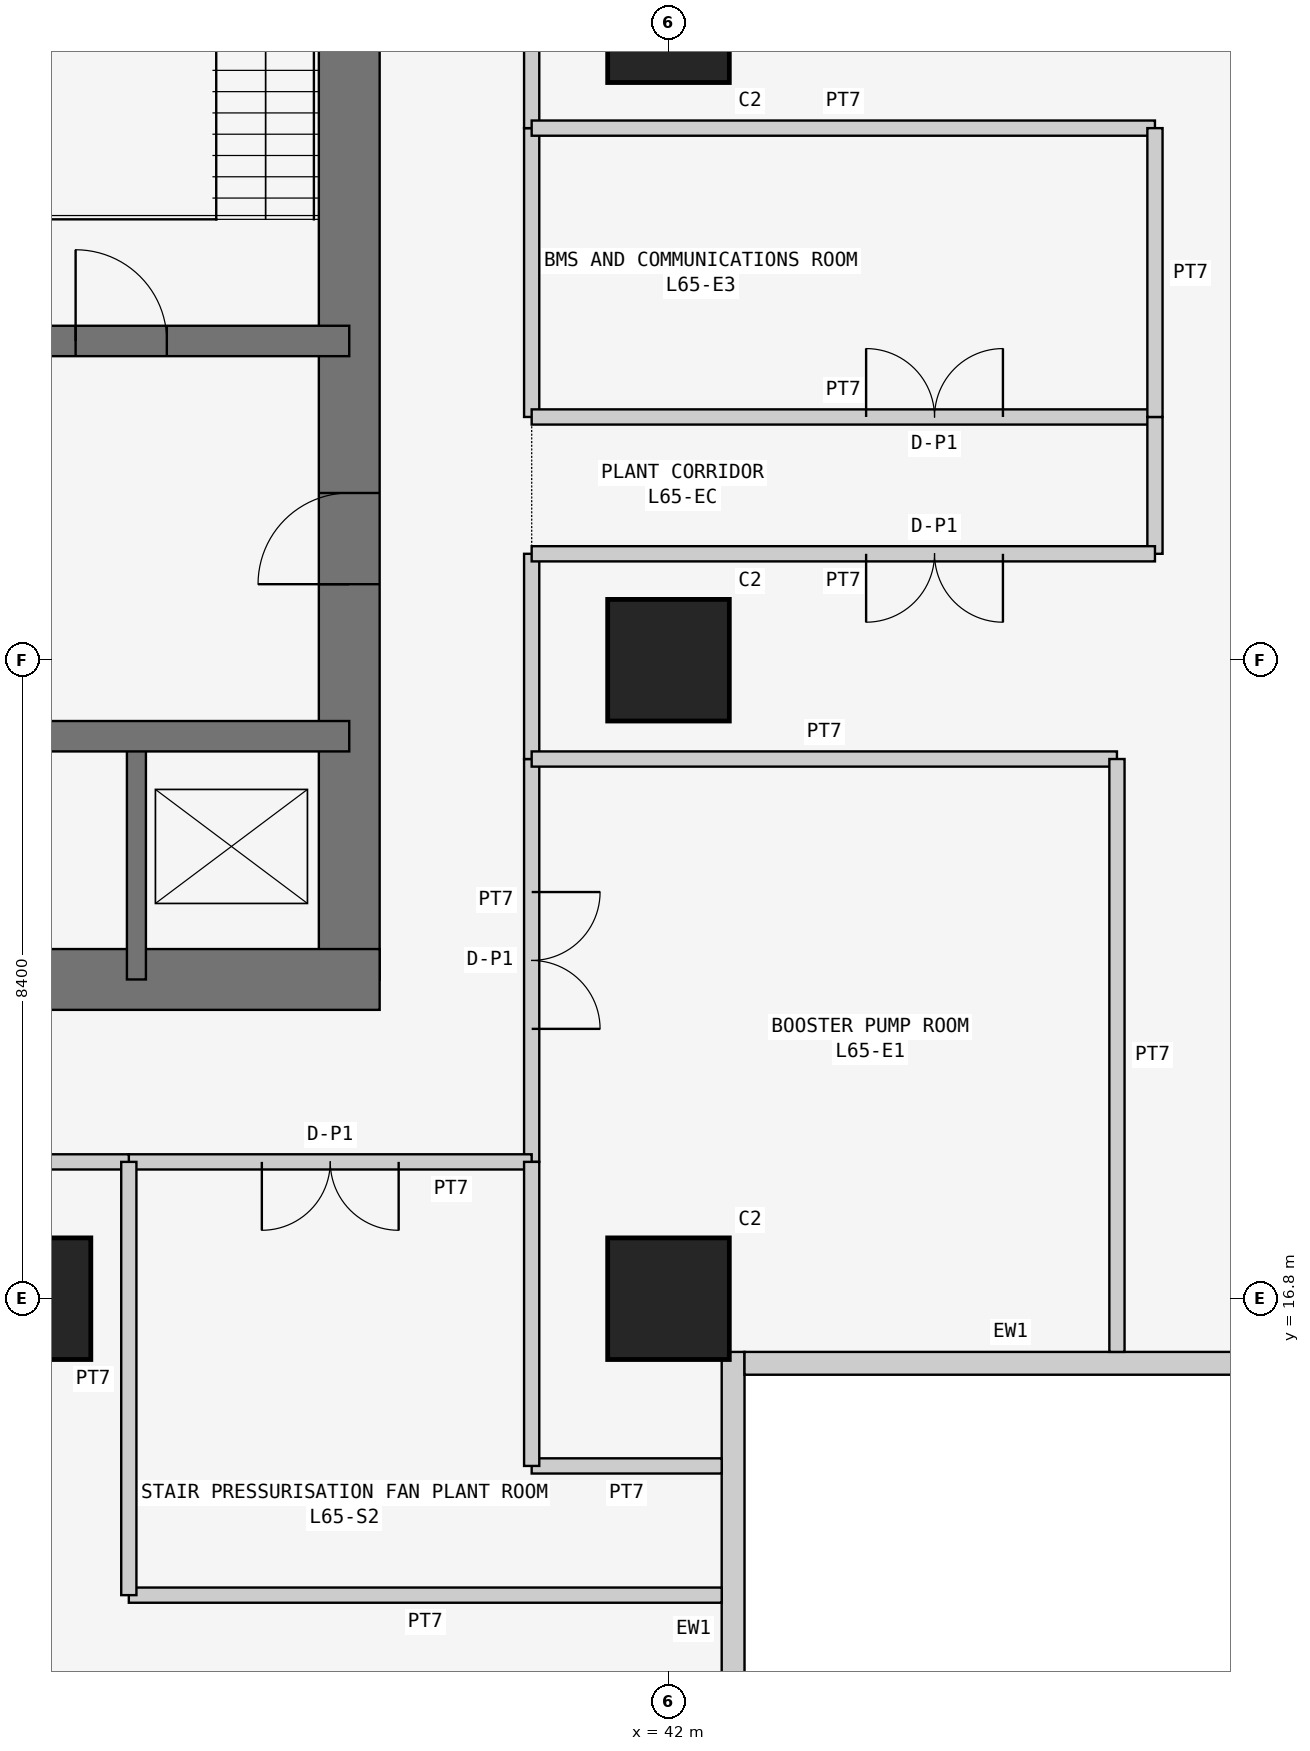
"""IFC4 building model, lengths in metres.
Left out: names, types, materials, properties, quantities, classifications, styles, units other than length and angle.
Written with IfcOpenShell. Run it as: python <this file> out.ifc"""

import sys

from ifc_helpers import new_model, si_unit, direction, frame, frame_2d, origin, origin_2d, place, context, subcontext, project, spatial, rectangle, extrude, element, fill, save


model = new_model("IFC4")
c1 = context("Model", 3, precision=1e-05, world=origin(), true_north=direction((0.0, 1.0)))
c2 = subcontext(c1, "Body", "Model", "MODEL_VIEW")
j1 = project(units=[si_unit("LENGTHUNIT", "METRE"), si_unit("PLANEANGLEUNIT", "RADIAN")], contexts=[c1])
p1 = place(None, origin())
s1 = spatial("IfcSite", under=j1, at=p1, CompositionType="ELEMENT")
p2 = place(p1, origin())
s2 = spatial("IfcBuilding", under=s1, at=p2, CompositionType="ELEMENT")
p3 = place(p2, frame((0.0, 0.0, 248.1)))
s3 = spatial("IfcBuildingStorey", under=s2, at=p3, CompositionType="ELEMENT", Elevation=248.1)
for number, where, z_axis, x_axis in (
    (1, (33.6, 16.8, 0.0), (0.0, 0.0, 1.0), (1.0, 0.0, 0.0)),
    (2, (42.0, 16.8, 0.0), (0.0, 0.0, 1.0), (1.0, 0.0, 0.0)),
    (3, (42.0, 25.2, 0.0), (0.0, 0.0, 1.0), (1.0, 0.0, 0.0)),
    (4, (42.0, 33.6, 0.0), (0.0, 0.0, 1.0), (1.0, 0.0, 0.0)),
):
    element("IfcColumn", number, at=place(p3, frame(where, z_axis=z_axis, x_axis=x_axis)), inside=s3, PredefinedType="COLUMN", context=c2, shape_type="SweptSolid", body=[
        extrude(rectangle(XDim=1.6, YDim=1.6, at=origin_2d()), origin(), (0.0, 0.0, 1.0), 6.0),
    ])
p4 = place(p3, frame((21.0, 21.0, 0.0), z_axis=(0.0, 0.0, 1.0), x_axis=(1.0, 0.0, 0.0)))
e5 = element("IfcWall", 5, at=p4, inside=s3, PredefinedType="SHEAR", context=c2, shape_type="SweptSolid", body=[
    extrude(rectangle(XDim=17.2, YDim=0.8, at=frame_2d((8.6, 0.0))), origin(), (0.0, 0.0, 1.0), 6.0),
])
p5 = place(p3, frame((37.8, 21.0, 0.0), z_axis=(0.0, 0.0, 1.0), x_axis=(0.0, 1.0, 0.0)))
e6 = element("IfcWall", 6, at=p5, inside=s3, PredefinedType="SHEAR", context=c2, shape_type="SweptSolid", body=[
    extrude(rectangle(XDim=17.2, YDim=0.8, at=frame_2d((8.6, 0.0))), origin(), (0.0, 0.0, 1.0), 6.0),
])
p6 = place(p5, frame((5.2, 0.0, 0.0)))
e7 = element("IfcOpeningElement", 7, at=p6, cuts=e6, PredefinedType="OPENING", context=c2, shape_type="SweptSolid", body=[
    extrude(rectangle(XDim=1.2, YDim=2.1, at=frame_2d((0.6, 1.05))), frame((0.0, 0.41, 0.0), z_axis=(0.0, -1.0, 0.0), x_axis=(1.0, 0.0, 0.0)), (0.0, 0.0, 1.0), 0.82),
])
p7 = place(p3, frame((26.6, 24.2, 0.0), z_axis=(0.0, 0.0, 1.0), x_axis=(1.0, 0.0, 0.0)))
e8 = element("IfcWall", 8, at=p7, inside=s3, PredefinedType="SHEAR", context=c2, shape_type="SweptSolid", body=[
    extrude(rectangle(XDim=11.2, YDim=0.4, at=frame_2d((5.6, 0.0))), origin(), (0.0, 0.0, 1.0), 6.0),
])
p8 = place(p7, frame((0.938, 0.0, 0.0)))
e9 = element("IfcOpeningElement", 9, at=p8, cuts=e8, PredefinedType="OPENING", context=c2, shape_type="SweptSolid", body=[
    extrude(rectangle(XDim=1.0, YDim=2.1, at=frame_2d((0.5, 1.05))), frame((0.0, 0.21, 0.0), z_axis=(0.0, -1.0, 0.0), x_axis=(1.0, 0.0, 0.0)), (0.0, 0.0, 1.0), 0.42),
])
p9 = place(p7, frame((3.75, 0.0, 0.0)))
e10 = element("IfcOpeningElement", 10, at=p9, cuts=e8, PredefinedType="OPENING", context=c2, shape_type="SweptSolid", body=[
    extrude(rectangle(XDim=0.9, YDim=2.1, at=frame_2d((0.45, 1.05))), frame((0.0, 0.21, 0.0), z_axis=(0.0, -1.0, 0.0), x_axis=(1.0, 0.0, 0.0)), (0.0, 0.0, 1.0), 0.42),
])
p10 = place(p3, frame((32.2, 29.4, 0.0), z_axis=(0.0, 0.0, 1.0), x_axis=(1.0, 0.0, 0.0)))
e11 = element("IfcWall", 11, at=p10, inside=s3, PredefinedType="SHEAR", context=c2, shape_type="SweptSolid", body=[
    extrude(rectangle(XDim=5.6, YDim=0.4, at=frame_2d((2.8, 0.0))), origin(), (0.0, 0.0, 1.0), 6.0),
])
p11 = place(p10, frame((2.0, 0.0, 0.0)))
e12 = element("IfcOpeningElement", 12, at=p11, cuts=e11, PredefinedType="OPENING", context=c2, shape_type="SweptSolid", body=[
    extrude(rectangle(XDim=1.2, YDim=2.1, at=frame_2d((0.6, 1.05))), frame((0.0, 0.21, 0.0), z_axis=(0.0, -1.0, 0.0), x_axis=(1.0, 0.0, 0.0)), (0.0, 0.0, 1.0), 0.42),
])
p12 = place(p3, frame((35.0, 21.0, 0.0), z_axis=(0.0, 0.0, 1.0), x_axis=(0.0, 1.0, 0.0)))
e13 = element("IfcWall", 13, at=p12, inside=s3, PredefinedType="SHEAR", context=c2, shape_type="SweptSolid", body=[
    extrude(rectangle(XDim=3.2, YDim=0.25, at=frame_2d((1.6, 0.0))), origin(), (0.0, 0.0, 1.0), 6.0),
])
p13 = place(p3, frame((42.85, 8.8, 0.0), z_axis=(0.0, 0.0, 1.0), x_axis=(0.0, 1.0, 0.0)))
e14 = element("IfcWall", 14, at=p13, inside=s3, PredefinedType="SOLIDWALL", context=c2, shape_type="SweptSolid", body=[
    extrude(rectangle(XDim=7.3, YDim=0.3, at=frame_2d((3.65, 0.0))), origin(), (0.0, 0.0, 1.0), 5.85),
])
p14 = place(p3, frame((43.0, 15.95, 0.0), z_axis=(0.0, 0.0, 1.0), x_axis=(1.0, 0.0, 0.0)))
e15 = element("IfcWall", 15, at=p14, inside=s3, PredefinedType="SOLIDWALL", context=c2, shape_type="SweptSolid", body=[
    extrude(rectangle(XDim=7.0, YDim=0.3, at=frame_2d((3.5, 0.0))), origin(), (0.0, 0.0, 1.0), 5.85),
])
p15 = place(p3, frame((40.2, 23.9, 0.0), z_axis=(0.0, 0.0, 1.0), x_axis=(0.0, -1.0, 0.0)))
e16 = element("IfcWall", 16, at=p15, inside=s3, PredefinedType="PARTITIONING", context=c2, shape_type="SweptSolid", body=[
    extrude(rectangle(XDim=5.3, YDim=0.2, at=frame_2d((2.65, 0.0))), origin(), (0.0, 0.0, 1.0), 5.85),
])
p16 = place(p15, frame((1.75, 0.0, 0.0)))
e17 = element("IfcOpeningElement", 17, at=p16, cuts=e16, PredefinedType="OPENING", context=c2, shape_type="SweptSolid", body=[
    extrude(rectangle(XDim=1.8, YDim=2.4, at=frame_2d((0.9, 1.2))), frame((0.0, 0.11, 0.0), z_axis=(0.0, -1.0, 0.0), x_axis=(1.0, 0.0, 0.0)), (0.0, 0.0, 1.0), 0.22),
])
p17 = place(p3, frame((40.2, 32.2, 0.0), z_axis=(0.0, 0.0, 1.0), x_axis=(0.0, -1.0, 0.0)))
e18 = element("IfcWall", 18, at=p17, inside=s3, PredefinedType="PARTITIONING", context=c2, shape_type="SweptSolid", body=[
    extrude(rectangle(XDim=3.8, YDim=0.2, at=frame_2d((1.9, 0.0))), origin(), (0.0, 0.0, 1.0), 5.85),
])
p18 = place(p3, frame((40.2, 26.6, 0.0), z_axis=(0.0, 0.0, 1.0), x_axis=(0.0, -1.0, 0.0)))
e19 = element("IfcWall", 19, at=p18, inside=s3, PredefinedType="PARTITIONING", context=c2, shape_type="SweptSolid", body=[
    extrude(rectangle(XDim=2.7, YDim=0.2, at=frame_2d((1.35, 0.0))), origin(), (0.0, 0.0, 1.0), 5.85),
])
p19 = place(p3, frame((40.2, 34.9, 0.0), z_axis=(0.0, 0.0, 1.0), x_axis=(0.0, -1.0, 0.0)))
e20 = element("IfcWall", 20, at=p19, inside=s3, PredefinedType="PARTITIONING", context=c2, shape_type="SweptSolid", body=[
    extrude(rectangle(XDim=2.7, YDim=0.2, at=frame_2d((1.35, 0.0))), origin(), (0.0, 0.0, 1.0), 5.85),
])
p20 = place(p3, frame((40.2, 18.6, 0.0), z_axis=(0.0, 0.0, 1.0), x_axis=(-1.0, 0.0, 0.0)))
e21 = element("IfcWall", 21, at=p20, inside=s3, PredefinedType="PARTITIONING", context=c2, shape_type="SweptSolid", body=[
    extrude(rectangle(XDim=5.3, YDim=0.2, at=frame_2d((2.65, 0.0))), origin(), (0.0, 0.0, 1.0), 5.85),
])
p21 = place(p20, frame((1.75, 0.0, 0.0)))
e22 = element("IfcOpeningElement", 22, at=p21, cuts=e21, PredefinedType="OPENING", context=c2, shape_type="SweptSolid", body=[
    extrude(rectangle(XDim=1.8, YDim=2.4, at=frame_2d((0.9, 1.2))), frame((0.0, 0.11, 0.0), z_axis=(0.0, -1.0, 0.0), x_axis=(1.0, 0.0, 0.0)), (0.0, 0.0, 1.0), 0.22),
])
p22 = place(p3, frame((34.9, 18.6, 0.0), z_axis=(0.0, 0.0, 1.0), x_axis=(-1.0, 0.0, 0.0)))
e23 = element("IfcWall", 23, at=p22, inside=s3, PredefinedType="PARTITIONING", context=c2, shape_type="SweptSolid", body=[
    extrude(rectangle(XDim=2.7, YDim=0.2, at=frame_2d((1.35, 0.0))), origin(), (0.0, 0.0, 1.0), 5.85),
])
p23 = place(p3, frame((40.2, 23.9, 0.0), z_axis=(0.0, 0.0, 1.0), x_axis=(1.0, 0.0, 0.0)))
e24 = element("IfcWall", 24, at=p23, inside=s3, PredefinedType="PARTITIONING", context=c2, shape_type="SweptSolid", body=[
    extrude(rectangle(XDim=7.7, YDim=0.2, at=frame_2d((3.85, 0.0))), origin(), (0.0, 0.0, 1.0), 5.85),
])
p24 = place(p3, frame((47.9, 23.9, 0.0), z_axis=(0.0, 0.0, 1.0), x_axis=(0.0, -1.0, 0.0)))
e25 = element("IfcWall", 25, at=p24, inside=s3, PredefinedType="PARTITIONING", context=c2, shape_type="SweptSolid", body=[
    extrude(rectangle(XDim=7.8, YDim=0.2, at=frame_2d((3.9, 0.0))), origin(), (0.0, 0.0, 1.0), 5.85),
])
p25 = place(p3, frame((42.7, 14.6, 0.0), z_axis=(0.0, 0.0, 1.0), x_axis=(-1.0, 0.0, 0.0)))
e26 = element("IfcWall", 26, at=p25, inside=s3, PredefinedType="PARTITIONING", context=c2, shape_type="SweptSolid", body=[
    extrude(rectangle(XDim=2.5, YDim=0.2, at=frame_2d((1.25, 0.0))), origin(), (0.0, 0.0, 1.0), 5.85),
])
p26 = place(p3, frame((40.2, 14.6, 0.0), z_axis=(0.0, 0.0, 1.0), x_axis=(0.0, 1.0, 0.0)))
e27 = element("IfcWall", 27, at=p26, inside=s3, PredefinedType="PARTITIONING", context=c2, shape_type="SweptSolid", body=[
    extrude(rectangle(XDim=4.0, YDim=0.2, at=frame_2d((2.0, 0.0))), origin(), (0.0, 0.0, 1.0), 5.85),
])
p27 = place(p3, frame((40.2, 28.4, 0.0), z_axis=(0.0, 0.0, 1.0), x_axis=(1.0, 0.0, 0.0)))
e28 = element("IfcWall", 28, at=p27, inside=s3, PredefinedType="PARTITIONING", context=c2, shape_type="SweptSolid", body=[
    extrude(rectangle(XDim=8.2, YDim=0.2, at=frame_2d((4.1, 0.0))), origin(), (0.0, 0.0, 1.0), 5.85),
])
p28 = place(p27, frame((4.4, 0.0, 0.0)))
e29 = element("IfcOpeningElement", 29, at=p28, cuts=e28, PredefinedType="OPENING", context=c2, shape_type="SweptSolid", body=[
    extrude(rectangle(XDim=1.8, YDim=2.4, at=frame_2d((0.9, 1.2))), frame((0.0, 0.11, 0.0), z_axis=(0.0, -1.0, 0.0), x_axis=(1.0, 0.0, 0.0)), (0.0, 0.0, 1.0), 0.22),
])
p29 = place(p3, frame((48.4, 28.4, 0.0), z_axis=(0.0, 0.0, 1.0), x_axis=(0.0, -1.0, 0.0)))
e30 = element("IfcWall", 30, at=p29, inside=s3, PredefinedType="PARTITIONING", context=c2, shape_type="SweptSolid", body=[
    extrude(rectangle(XDim=1.8, YDim=0.2, at=frame_2d((0.9, 0.0))), origin(), (0.0, 0.0, 1.0), 5.85),
])
p30 = place(p3, frame((48.4, 26.6, 0.0), z_axis=(0.0, 0.0, 1.0), x_axis=(-1.0, 0.0, 0.0)))
e31 = element("IfcWall", 31, at=p30, inside=s3, PredefinedType="PARTITIONING", context=c2, shape_type="SweptSolid", body=[
    extrude(rectangle(XDim=8.2, YDim=0.2, at=frame_2d((4.1, 0.0))), origin(), (0.0, 0.0, 1.0), 5.85),
])
p31 = place(p30, frame((2.0, 0.0, 0.0)))
e32 = element("IfcOpeningElement", 32, at=p31, cuts=e31, PredefinedType="OPENING", context=c2, shape_type="SweptSolid", body=[
    extrude(rectangle(XDim=1.8, YDim=2.4, at=frame_2d((0.9, 1.2))), frame((0.0, 0.11, 0.0), z_axis=(0.0, -1.0, 0.0), x_axis=(1.0, 0.0, 0.0)), (0.0, 0.0, 1.0), 0.22),
])
p32 = place(p3, frame((40.2, 32.2, 0.0), z_axis=(0.0, 0.0, 1.0), x_axis=(1.0, 0.0, 0.0)))
e33 = element("IfcWall", 33, at=p32, inside=s3, PredefinedType="PARTITIONING", context=c2, shape_type="SweptSolid", body=[
    extrude(rectangle(XDim=8.2, YDim=0.2, at=frame_2d((4.1, 0.0))), origin(), (0.0, 0.0, 1.0), 5.85),
])
p33 = place(p3, frame((48.4, 32.2, 0.0), z_axis=(0.0, 0.0, 1.0), x_axis=(0.0, -1.0, 0.0)))
e34 = element("IfcWall", 34, at=p33, inside=s3, PredefinedType="PARTITIONING", context=c2, shape_type="SweptSolid", body=[
    extrude(rectangle(XDim=3.8, YDim=0.2, at=frame_2d((1.9, 0.0))), origin(), (0.0, 0.0, 1.0), 5.85),
])
p34 = place(p3, frame((42.7, 12.9, 0.0), z_axis=(0.0, 0.0, 1.0), x_axis=(-1.0, 0.0, 0.0)))
e35 = element("IfcWall", 35, at=p34, inside=s3, PredefinedType="PARTITIONING", context=c2, shape_type="SweptSolid", body=[
    extrude(rectangle(XDim=7.8, YDim=0.2, at=frame_2d((3.9, 0.0))), origin(), (0.0, 0.0, 1.0), 5.85),
])
p35 = place(p3, frame((34.9, 12.9, 0.0), z_axis=(0.0, 0.0, 1.0), x_axis=(0.0, 1.0, 0.0)))
e36 = element("IfcWall", 36, at=p35, inside=s3, PredefinedType="PARTITIONING", context=c2, shape_type="SweptSolid", body=[
    extrude(rectangle(XDim=5.7, YDim=0.2, at=frame_2d((2.85, 0.0))), origin(), (0.0, 0.0, 1.0), 5.85),
])
p36 = place(p16, origin())
e37 = element("IfcDoor", 37, at=p36, inside=s3, OperationType="DOUBLE_DOOR_SINGLE_SWING", PredefinedType="DOOR", context=c2, shape_type="SweptSolid", body=[
    extrude(rectangle(XDim=1.8, YDim=2.4, at=frame_2d((0.9, 1.2))), frame((0.0, 0.025, 0.0), z_axis=(0.0, -1.0, 0.0), x_axis=(1.0, 0.0, 0.0)), (0.0, 0.0, 1.0), 0.05),
])
fill(e17, e37)
p37 = place(p28, origin())
e38 = element("IfcDoor", 38, at=p37, inside=s3, OperationType="DOUBLE_DOOR_SINGLE_SWING", PredefinedType="DOOR", context=c2, shape_type="SweptSolid", body=[
    extrude(rectangle(XDim=1.8, YDim=2.4, at=frame_2d((0.9, 1.2))), frame((0.0, 0.025, 0.0), z_axis=(0.0, -1.0, 0.0), x_axis=(1.0, 0.0, 0.0)), (0.0, 0.0, 1.0), 0.05),
])
fill(e29, e38)
p38 = place(p31, origin())
e39 = element("IfcDoor", 39, at=p38, inside=s3, OperationType="DOUBLE_DOOR_SINGLE_SWING", PredefinedType="DOOR", context=c2, shape_type="SweptSolid", body=[
    extrude(rectangle(XDim=1.8, YDim=2.4, at=frame_2d((0.9, 1.2))), frame((0.0, 0.025, 0.0), z_axis=(0.0, -1.0, 0.0), x_axis=(1.0, 0.0, 0.0)), (0.0, 0.0, 1.0), 0.05),
])
fill(e32, e39)
p39 = place(p21, origin())
e40 = element("IfcDoor", 40, at=p39, inside=s3, OperationType="DOUBLE_DOOR_SINGLE_SWING", PredefinedType="DOOR", context=c2, shape_type="SweptSolid", body=[
    extrude(rectangle(XDim=1.8, YDim=2.4, at=frame_2d((0.9, 1.2))), frame((0.0, 0.025, 0.0), z_axis=(0.0, -1.0, 0.0), x_axis=(1.0, 0.0, 0.0)), (0.0, 0.0, 1.0), 0.05),
])
fill(e22, e40)
p40 = place(p6, origin())
e41 = element("IfcDoor", 41, at=p40, inside=s3, OperationType="SINGLE_SWING_LEFT", PredefinedType="DOOR", context=c2, shape_type="SweptSolid", body=[
    extrude(rectangle(XDim=1.2, YDim=2.1, at=frame_2d((0.6, 1.05))), frame((0.0, 0.025, 0.0), z_axis=(0.0, -1.0, 0.0), x_axis=(1.0, 0.0, 0.0)), (0.0, 0.0, 1.0), 0.05),
])
fill(e7, e41)
p41 = place(p11, origin())
e42 = element("IfcDoor", 42, at=p41, inside=s3, OperationType="SINGLE_SWING_LEFT", PredefinedType="DOOR", context=c2, shape_type="SweptSolid", body=[
    extrude(rectangle(XDim=1.2, YDim=2.1, at=frame_2d((0.6, 1.05))), frame((0.0, 0.025, 0.0), z_axis=(0.0, -1.0, 0.0), x_axis=(1.0, 0.0, 0.0)), (0.0, 0.0, 1.0), 0.05),
])
fill(e12, e42)
save(model, sys.argv[1])
